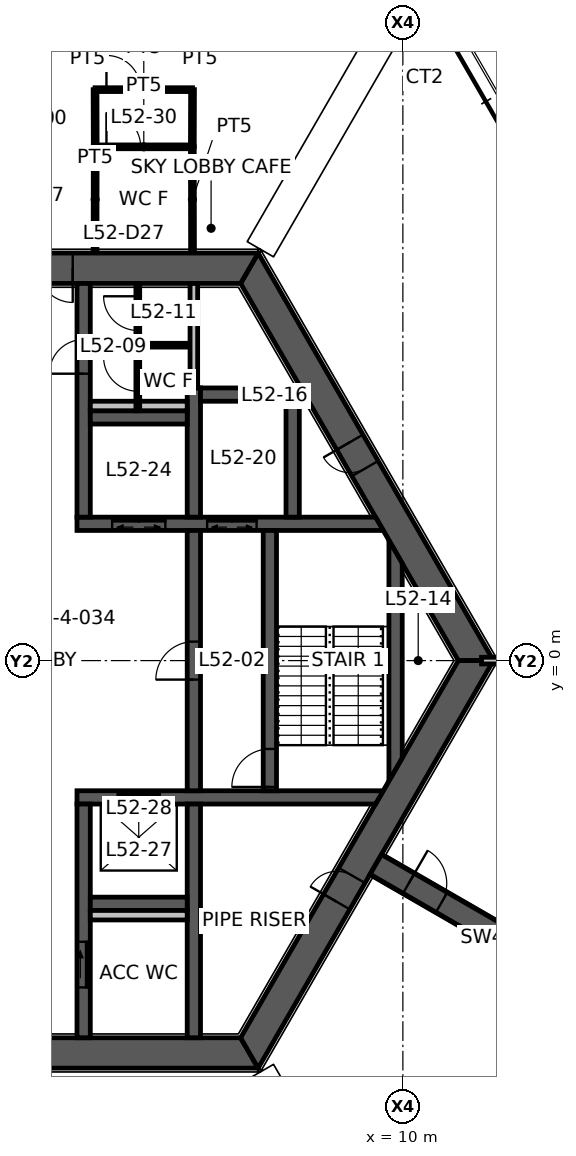
"""IFC4 building model, lengths in metres.
Left out: names, types, materials, properties, quantities, classifications, styles, units other than length and angle.
Written with IfcOpenShell. Run it as: python <this file> out.ifc"""

import sys

from ifc_helpers import new_model, si_unit, direction, frame, frame_2d, origin, place, context, subcontext, project, spatial, polyline, rectangle, outline, extrude, element, fill, save


model = new_model("IFC4")
c1 = context("Model", 3, precision=1e-05, world=origin(), true_north=direction((0.0, 1.0)))
c2 = subcontext(c1, "Body", "Model", "MODEL_VIEW")
j1 = project(units=[si_unit("LENGTHUNIT", "METRE"), si_unit("PLANEANGLEUNIT", "RADIAN")], contexts=[c1])
p1 = place(None, origin())
s1 = spatial("IfcSite", under=j1, at=p1, CompositionType="ELEMENT")
p2 = place(p1, origin())
s2 = spatial("IfcBuilding", under=s1, at=p2, CompositionType="ELEMENT")
p3 = place(p2, frame((0.0, 0.0, 208.3)))
s3 = spatial("IfcBuildingStorey", under=s2, at=p3, CompositionType="ELEMENT", Elevation=208.3)
p4 = place(p3, frame((11.922, 0.0, 0.0), z_axis=(0.0, 0.0, 1.0), x_axis=(-0.500004296715, 0.866022923061, 0.0)))
e1 = element("IfcWall", 1, at=p4, inside=s3, PredefinedType="SHEAR", context=c2, shape_type="SweptSolid", body=[
    extrude(outline(polyline([(-0.231, -0.4), (5.835, -0.4), (6.635, -0.4), (12.153, -0.4), (11.691, 0.4), (6.635, 0.4), (5.835, 0.4), (0.231, 0.4), (-0.231, -0.4)])), origin(), (0.0, 0.0, 1.0), 4.5),
])
p5 = place(p4, frame((5.835, 0.0, 0.0)))
e2 = element("IfcOpeningElement", 2, at=p5, cuts=e1, PredefinedType="OPENING", context=c2, shape_type="SweptSolid", body=[
    extrude(rectangle(XDim=0.8, YDim=2.1, at=frame_2d((0.4, 1.05))), frame((0.0, 0.41, 0.0), z_axis=(0.0, -1.0, 0.0), x_axis=(1.0, 0.0, 0.0)), (0.0, 0.0, 1.0), 0.82),
])
p6 = place(p3, frame((5.961, 10.325, 0.0), z_axis=(0.0, 0.0, 1.0), x_axis=(-1.0, 0.0, 0.0)))
e3 = element("IfcWall", 3, at=p6, inside=s3, PredefinedType="SHEAR", context=c2, shape_type="SweptSolid", body=[
    extrude(outline(polyline([(-0.231, -0.4), (4.649, -0.4), (5.549, -0.4), (6.374, -0.4), (7.273, -0.4), (12.153, -0.4), (11.691, 0.4), (7.273, 0.4), (6.374, 0.4), (5.549, 0.4), (4.649, 0.4), (0.231, 0.4), (-0.231, -0.4)])), origin(), (0.0, 0.0, 1.0), 4.5),
])
p7 = place(p6, frame((6.374, 0.0, 0.0)))
e4 = element("IfcOpeningElement", 4, at=p7, cuts=e3, PredefinedType="OPENING", context=c2, shape_type="SweptSolid", body=[
    extrude(rectangle(XDim=0.9, YDim=2.1, at=frame_2d((0.45, 1.05))), frame((0.0, 0.41, 0.0), z_axis=(0.0, -1.0, 0.0), x_axis=(1.0, 0.0, 0.0)), (0.0, 0.0, 1.0), 0.82),
])
p8 = place(p6, frame((4.649, 0.0, 0.0)))
e5 = element("IfcOpeningElement", 5, at=p8, cuts=e3, PredefinedType="OPENING", context=c2, shape_type="SweptSolid", body=[
    extrude(rectangle(XDim=0.9, YDim=2.1, at=frame_2d((0.45, 1.05))), frame((0.0, 0.41, 0.0), z_axis=(0.0, -1.0, 0.0), x_axis=(1.0, 0.0, 0.0)), (0.0, 0.0, 1.0), 0.82),
])
p9 = place(p3, frame((-5.961, -10.325, 0.0), z_axis=(0.0, 0.0, 1.0), x_axis=(1.0, 0.0, 0.0)))
e6 = element("IfcWall", 6, at=p9, inside=s3, PredefinedType="SHEAR", context=c2, shape_type="SweptSolid", body=[
    extrude(outline(polyline([(-0.231, -0.4), (5.461, -0.4), (6.461, -0.4), (12.153, -0.4), (11.691, 0.4), (6.461, 0.4), (5.461, 0.4), (0.231, 0.4), (-0.231, -0.4)])), origin(), (0.0, 0.0, 1.0), 4.5),
])
p10 = place(p9, frame((5.461, 0.0, 0.0)))
e7 = element("IfcOpeningElement", 7, at=p10, cuts=e6, PredefinedType="OPENING", context=c2, shape_type="SweptSolid", body=[
    extrude(rectangle(XDim=1.0, YDim=2.1, at=frame_2d((0.5, 1.05))), frame((0.0, 0.41, 0.0), z_axis=(0.0, -1.0, 0.0), x_axis=(1.0, 0.0, 0.0)), (0.0, 0.0, 1.0), 0.82),
])
p11 = place(p3, frame((5.961, -10.325, 0.0), z_axis=(0.0, 0.0, 1.0), x_axis=(0.500004296715, 0.866022923061, 0.0)))
e8 = element("IfcWall", 8, at=p11, inside=s3, PredefinedType="SHEAR", context=c2, shape_type="SweptSolid", body=[
    extrude(outline(polyline([(-0.231, -0.4), (4.594, -0.4), (5.394, -0.4), (12.153, -0.4), (11.691, 0.4), (5.394, 0.4), (4.594, 0.4), (0.231, 0.4), (-0.231, -0.4)])), origin(), (0.0, 0.0, 1.0), 4.5),
])
p12 = place(p11, frame((4.594, 0.0, 0.0)))
e9 = element("IfcOpeningElement", 9, at=p12, cuts=e8, PredefinedType="OPENING", context=c2, shape_type="SweptSolid", body=[
    extrude(rectangle(XDim=0.8, YDim=2.1, at=frame_2d((0.4, 1.05))), frame((0.0, 0.41, 0.0), z_axis=(0.0, -1.0, 0.0), x_axis=(1.0, 0.0, 0.0)), (0.0, 0.0, 1.0), 0.82),
])
p13 = place(p3, frame((9.288, -5.363, 0.0), z_axis=(0.0, 0.0, 1.0), x_axis=(0.866031736626, -0.499989031036, 0.0)))
e10 = element("IfcWall", 10, at=p13, inside=s3, PredefinedType="SHEAR", context=c2, shape_type="SweptSolid", body=[
    extrude(rectangle(XDim=7.796, YDim=0.6, at=frame_2d((3.898, 0.0))), origin(), (0.0, 0.0, 1.0), 4.5),
])
p14 = place(p13, frame((1.0, 0.0, 0.0)))
e11 = element("IfcOpeningElement", 11, at=p14, cuts=e10, PredefinedType="OPENING", context=c2, shape_type="SweptSolid", body=[
    extrude(rectangle(XDim=1.0, YDim=2.1, at=frame_2d((0.5, 1.05))), frame((0.0, 0.31, 0.0), z_axis=(0.0, -1.0, 0.0), x_axis=(1.0, 0.0, 0.0)), (0.0, 0.0, 1.0), 0.62),
])
p15 = place(p3, frame((1.425, 3.6, 0.0), z_axis=(0.0, 0.0, 1.0), x_axis=(1.0, 0.0, 0.0)))
e12 = element("IfcWall", 12, at=p15, inside=s3, PredefinedType="SHEAR", context=c2, shape_type="SweptSolid", body=[
    extrude(outline(polyline([(0.0, -0.175), (0.925, -0.175), (2.325, -0.175), (3.425, -0.175), (4.725, -0.175), (8.058, -0.175), (7.856, 0.175), (4.725, 0.175), (3.425, 0.175), (2.325, 0.175), (0.925, 0.175), (0.0, 0.175), (0.0, -0.175)])), origin(), (0.0, 0.0, 1.0), 4.5),
])
p16 = place(p15, frame((0.925, 0.0, 0.0)))
e13 = element("IfcOpeningElement", 13, at=p16, cuts=e12, PredefinedType="OPENING", context=c2, shape_type="SweptSolid", body=[
    extrude(rectangle(XDim=1.4, YDim=2.1, at=frame_2d((0.7, 1.05))), frame((0.0, 0.185, 0.0), z_axis=(0.0, -1.0, 0.0), x_axis=(1.0, 0.0, 0.0)), (0.0, 0.0, 1.0), 0.37),
])
p17 = place(p15, frame((3.425, 0.0, 0.0)))
e14 = element("IfcOpeningElement", 14, at=p17, cuts=e12, PredefinedType="OPENING", context=c2, shape_type="SweptSolid", body=[
    extrude(rectangle(XDim=1.3, YDim=2.1, at=frame_2d((0.65, 1.05))), frame((0.0, 0.185, 0.0), z_axis=(0.0, -1.0, 0.0), x_axis=(1.0, 0.0, 0.0)), (0.0, 0.0, 1.0), 0.37),
])
p18 = place(p3, frame((1.425, -3.6, 0.0), z_axis=(0.0, 0.0, 1.0), x_axis=(1.0, 0.0, 0.0)))
e15 = element("IfcWall", 15, at=p18, inside=s3, PredefinedType="SHEAR", context=c2, shape_type="SweptSolid", body=[
    extrude(outline(polyline([(0.0, -0.175), (1.075, -0.175), (2.175, -0.175), (7.856, -0.175), (8.058, 0.175), (2.175, 0.175), (1.075, 0.175), (0.0, 0.175), (0.0, -0.175)])), origin(), (0.0, 0.0, 1.0), 4.5),
])
p19 = place(p18, frame((1.075, 0.0, 0.0)))
e16 = element("IfcOpeningElement", 16, at=p19, cuts=e15, PredefinedType="OPENING", context=c2, shape_type="SweptSolid", body=[
    extrude(rectangle(XDim=1.1, YDim=2.1, at=frame_2d((0.55, 1.05))), frame((0.0, 0.185, 0.0), z_axis=(0.0, -1.0, 0.0), x_axis=(1.0, 0.0, 0.0)), (0.0, 0.0, 1.0), 0.37),
])
p20 = place(p3, frame((1.6, 3.775, 0.0), z_axis=(0.0, 0.0, 1.0), x_axis=(0.0, 1.0, 0.0)))
e17 = element("IfcWall", 17, at=p20, inside=s3, PredefinedType="SHEAR", context=c2, shape_type="SweptSolid", body=[
    extrude(rectangle(XDim=6.15, YDim=0.35, at=frame_2d((3.075, 0.0))), origin(), (0.0, 0.0, 1.0), 4.5),
])
p21 = place(p20, frame((3.775, 0.0, 0.0)))
e18 = element("IfcOpeningElement", 18, at=p21, cuts=e17, PredefinedType="OPENING", context=c2, shape_type="SweptSolid", body=[
    extrude(rectangle(XDim=0.9, YDim=2.1, at=frame_2d((0.45, 1.05))), frame((0.0, 0.185, 0.0), z_axis=(0.0, -1.0, 0.0), x_axis=(1.0, 0.0, 0.0)), (0.0, 0.0, 1.0), 0.37),
])
p22 = place(p3, frame((1.6, -3.775, 0.0), z_axis=(0.0, 0.0, 1.0), x_axis=(0.0, -1.0, 0.0)))
e19 = element("IfcWall", 19, at=p22, inside=s3, PredefinedType="SHEAR", context=c2, shape_type="SweptSolid", body=[
    extrude(rectangle(XDim=6.15, YDim=0.35, at=frame_2d((3.075, 0.0))), origin(), (0.0, 0.0, 1.0), 4.5),
])
p23 = place(p22, frame((3.625, 0.0, 0.0)))
e20 = element("IfcOpeningElement", 20, at=p23, cuts=e19, PredefinedType="OPENING", context=c2, shape_type="SweptSolid", body=[
    extrude(rectangle(XDim=1.2, YDim=2.1, at=frame_2d((0.6, 1.05))), frame((0.0, 0.185, 0.0), z_axis=(0.0, -1.0, 0.0), x_axis=(1.0, 0.0, 0.0)), (0.0, 0.0, 1.0), 0.37),
])
p24 = place(p3, frame((4.5, -3.425, 0.0), z_axis=(0.0, 0.0, 1.0), x_axis=(0.0, 1.0, 0.0)))
e21 = element("IfcWall", 21, at=p24, inside=s3, PredefinedType="SHEAR", context=c2, shape_type="SweptSolid", body=[
    extrude(rectangle(XDim=6.85, YDim=0.35, at=frame_2d((3.425, 0.0))), origin(), (0.0, 0.0, 1.0), 4.5),
])
p25 = place(p24, frame((2.925, 0.0, 0.0)))
e22 = element("IfcOpeningElement", 22, at=p25, cuts=e21, PredefinedType="OPENING", context=c2, shape_type="SweptSolid", body=[
    extrude(rectangle(XDim=1.0, YDim=2.1, at=frame_2d((0.5, 1.05))), frame((0.0, 0.185, 0.0), z_axis=(0.0, -1.0, 0.0), x_axis=(1.0, 0.0, 0.0)), (0.0, 0.0, 1.0), 0.37),
])
p26 = place(p3, frame((6.5, -3.425, 0.0), z_axis=(0.0, 0.0, 1.0), x_axis=(0.0, 1.0, 0.0)))
e23 = element("IfcWall", 23, at=p26, inside=s3, PredefinedType="SHEAR", context=c2, shape_type="SweptSolid", body=[
    extrude(rectangle(XDim=6.85, YDim=0.35, at=frame_2d((3.425, 0.0))), origin(), (0.0, 0.0, 1.0), 4.5),
])
p27 = place(p26, frame((0.1, 0.0, 0.0)))
e24 = element("IfcOpeningElement", 24, at=p27, cuts=e23, PredefinedType="OPENING", context=c2, shape_type="SweptSolid", body=[
    extrude(rectangle(XDim=1.0, YDim=2.1, at=frame_2d((0.5, 1.05))), frame((0.0, 0.185, 0.0), z_axis=(0.0, -1.0, 0.0), x_axis=(1.0, 0.0, 0.0)), (0.0, 0.0, 1.0), 0.37),
])
p28 = place(p3, frame((4.5, 3.775, 0.0), z_axis=(0.0, 0.0, 1.0), x_axis=(0.0, 1.0, 0.0)))
e25 = element("IfcWall", 25, at=p28, inside=s3, PredefinedType="SHEAR", context=c2, shape_type="SweptSolid", body=[
    extrude(rectangle(XDim=3.4, YDim=0.35, at=frame_2d((1.7, 0.0))), origin(), (0.0, 0.0, 1.0), 4.5),
])
p29 = place(p3, frame((4.5, -3.775, 0.0), z_axis=(0.0, 0.0, 1.0), x_axis=(0.0, -1.0, 0.0)))
e26 = element("IfcWall", 26, at=p29, inside=s3, PredefinedType="SHEAR", context=c2, shape_type="SweptSolid", body=[
    extrude(rectangle(XDim=6.15, YDim=0.35, at=frame_2d((3.075, 0.0))), origin(), (0.0, 0.0, 1.0), 4.5),
])
for number, where, z_axis, x_axis in (
    (27, (1.775, 6.4, 0.0), (0.0, 0.0, 1.0), (1.0, 0.0, 0.0)),
    (28, (1.775, -6.4, 0.0), (0.0, 0.0, 1.0), (1.0, 0.0, 0.0)),
):
    element("IfcWall", number, at=place(p3, frame(where, z_axis=z_axis, x_axis=x_axis)), inside=s3, PredefinedType="SHEAR", context=c2, shape_type="SweptSolid", body=[
        extrude(rectangle(XDim=2.55, YDim=0.35, at=frame_2d((1.275, 0.0))), origin(), (0.0, 0.0, 1.0), 4.5),
    ])
p30 = place(p3, frame((4.675, 7.0, 0.0), z_axis=(0.0, 0.0, 1.0), x_axis=(1.0, 0.0, 0.0)))
e29 = element("IfcWall", 29, at=p30, inside=s3, PredefinedType="SHEAR", context=c2, shape_type="SweptSolid", body=[
    extrude(rectangle(XDim=2.6, YDim=0.35, at=frame_2d((1.3, 0.0))), origin(), (0.0, 0.0, 1.0), 4.5),
])
p31 = place(p3, frame((7.1, 3.775, 0.0), z_axis=(0.0, 0.0, 1.0), x_axis=(0.0, 1.0, 0.0)))
e30 = element("IfcWall", 30, at=p31, inside=s3, PredefinedType="SHEAR", context=c2, shape_type="SweptSolid", body=[
    extrude(rectangle(XDim=3.05, YDim=0.35, at=frame_2d((1.525, 0.0))), origin(), (0.0, 0.0, 1.0), 4.5),
])
p32 = place(p3, frame((9.808, -2.862, 0.0), z_axis=(0.0, 0.0, 1.0), x_axis=(0.0, 1.0, 0.0)))
e31 = element("IfcWall", 31, at=p32, inside=s3, PredefinedType="SHEAR", context=c2, shape_type="SweptSolid", body=[
    extrude(outline(polyline([(0.303, -0.175), (5.421, -0.175), (6.028, 0.175), (-0.303, 0.175), (0.303, -0.175)])), origin(), (0.0, 0.0, 1.0), 4.5),
])
p33 = place(p3, frame((4.5, 7.175, 0.0), z_axis=(0.0, 0.0, 1.0), x_axis=(0.0, 1.0, 0.0)))
e32 = element("IfcWall", 32, at=p33, inside=s3, PredefinedType="STANDARD", context=c2, shape_type="SweptSolid", body=[
    extrude(rectangle(XDim=2.75, YDim=0.2, at=frame_2d((1.375, 0.0))), origin(), (0.0, 0.0, 1.0), 4.5),
])
for number, where, z_axis, x_axis in (
    (33, (1.775, 6.7, 0.0), (0.0, 0.0, 1.0), (1.0, 0.0, 0.0)),
    (34, (1.775, -6.7, 0.0), (0.0, 0.0, 1.0), (1.0, 0.0, 0.0)),
):
    element("IfcWall", number, at=place(p3, frame(where, z_axis=z_axis, x_axis=x_axis)), inside=s3, PredefinedType="PLUMBINGWALL", context=c2, shape_type="SweptSolid", body=[
        extrude(rectangle(XDim=2.55, YDim=0.25, at=frame_2d((1.275, 0.0))), origin(), (0.0, 0.0, 1.0), 4.5),
    ])
p34 = place(p3, frame((3.025, 6.575, 0.0), z_axis=(0.0, 0.0, 1.0), x_axis=(0.0, 1.0, 0.0)))
e35 = element("IfcWall", 35, at=p34, inside=s3, PredefinedType="PARTITIONING", context=c2, shape_type="SweptSolid", body=[
    extrude(rectangle(XDim=3.35, YDim=0.1, at=frame_2d((1.675, 0.0))), origin(), (0.0, 0.0, 1.0), 3.55),
])
p35 = place(p34, frame((0.512, 0.0, 0.0)))
e36 = element("IfcOpeningElement", 36, at=p35, cuts=e35, PredefinedType="OPENING", context=c2, shape_type="SweptSolid", body=[
    extrude(rectangle(XDim=0.9, YDim=2.1, at=frame_2d((0.45, 1.05))), frame((0.0, 0.06, 0.0), z_axis=(0.0, -1.0, 0.0), x_axis=(1.0, 0.0, 0.0)), (0.0, 0.0, 1.0), 0.12),
])
p36 = place(p34, frame((2.113, 0.0, 0.0)))
e37 = element("IfcOpeningElement", 37, at=p36, cuts=e35, PredefinedType="OPENING", context=c2, shape_type="SweptSolid", body=[
    extrude(rectangle(XDim=0.9, YDim=2.1, at=frame_2d((0.45, 1.05))), frame((0.0, 0.06, 0.0), z_axis=(0.0, -1.0, 0.0), x_axis=(1.0, 0.0, 0.0)), (0.0, 0.0, 1.0), 0.12),
])
p37 = place(p3, frame((3.075, 8.3, 0.0), z_axis=(0.0, 0.0, 1.0), x_axis=(1.0, 0.0, 0.0)))
e38 = element("IfcWall", 38, at=p37, inside=s3, PredefinedType="PARTITIONING", context=c2, shape_type="SweptSolid", body=[
    extrude(rectangle(XDim=1.25, YDim=0.1, at=frame_2d((0.625, 0.0))), origin(), (0.0, 0.0, 1.0), 3.55),
])
p38 = place(p3, frame((12.07, 0.0, 0.0), z_axis=(0.0, 0.0, 1.0), x_axis=(1.0, 0.0, 0.0)))
e39 = element("IfcWall", 39, at=p38, inside=s3, PredefinedType="PARTITIONING", context=c2, shape_type="SweptSolid", body=[
    extrude(rectangle(XDim=7.93, YDim=0.175, at=frame_2d((3.965, 0.0))), origin(), (0.0, 0.0, 1.0), 3.65),
])
p39 = place(p38, frame((1.13, 0.0, 0.0)))
e40 = element("IfcOpeningElement", 40, at=p39, cuts=e39, PredefinedType="OPENING", context=c2, shape_type="SweptSolid", body=[
    extrude(rectangle(XDim=1.0, YDim=2.1, at=frame_2d((0.5, 1.05))), frame((0.0, 0.098, 0.0), z_axis=(0.0, -1.0, 0.0), x_axis=(1.0, 0.0, 0.0)), (0.0, 0.0, 1.0), 0.195),
])
p40 = place(p3, frame((1.9, 13.52, 0.0), z_axis=(0.0, 0.0, 1.0), x_axis=(1.0, 0.0, 0.0)))
e41 = element("IfcWall", 41, at=p40, inside=s3, PredefinedType="PARTITIONING", context=c2, shape_type="SweptSolid", body=[
    extrude(rectangle(XDim=2.565, YDim=0.1, at=frame_2d((1.283, 0.0))), origin(), (0.0, 0.0, 1.0), 3.55),
])
p41 = place(p40, frame((0.3, 0.0, 0.0)))
e42 = element("IfcOpeningElement", 42, at=p41, cuts=e41, PredefinedType="OPENING", context=c2, shape_type="SweptSolid", body=[
    extrude(rectangle(XDim=0.9, YDim=2.1, at=frame_2d((0.45, 1.05))), frame((0.0, 0.06, 0.0), z_axis=(0.0, -1.0, 0.0), x_axis=(1.0, 0.0, 0.0)), (0.0, 0.0, 1.0), 0.12),
])
for number, where, z_axis, x_axis in (
    (43, (1.9, 10.745, 0.0), (0.0, 0.0, 1.0), (0.002, 1.0, 0.0)),
    (44, (4.46, 13.525, 0.0), (0.0, 0.0, 1.0), (0.002, -1.0, 0.0)),
):
    element("IfcWall", number, at=place(p3, frame(where, z_axis=z_axis, x_axis=x_axis)), inside=s3, PredefinedType="PARTITIONING", context=c2, shape_type="SweptSolid", body=[
        extrude(rectangle(XDim=2.78, YDim=0.1, at=frame_2d((1.39, 0.0))), origin(), (0.0, 0.0, 1.0), 3.55),
    ])
p42 = place(p3, frame((1.9, 15.025, 0.0), z_axis=(0.0, 0.0, 1.0), x_axis=(1.0, 0.0, 0.0)))
e45 = element("IfcWall", 45, at=p42, inside=s3, PredefinedType="PARTITIONING", context=c2, shape_type="SweptSolid", body=[
    extrude(rectangle(XDim=2.565, YDim=0.1, at=frame_2d((1.283, 0.0))), origin(), (0.0, 0.0, 1.0), 3.55),
])
p43 = place(p42, frame((0.3, 0.0, 0.0)))
e46 = element("IfcOpeningElement", 46, at=p43, cuts=e45, PredefinedType="OPENING", context=c2, shape_type="SweptSolid", body=[
    extrude(rectangle(XDim=0.9, YDim=2.1, at=frame_2d((0.45, 1.05))), frame((0.0, 0.06, 0.0), z_axis=(0.0, -1.0, 0.0), x_axis=(1.0, 0.0, 0.0)), (0.0, 0.0, 1.0), 0.12),
])
for number, where, z_axis, x_axis in (
    (47, (1.905, 13.525, 0.0), (0.0, 0.0, 1.0), (-0.003, 1.0, 0.0)),
    (48, (4.465, 15.025, 0.0), (0.0, 0.0, 1.0), (-0.003, -1.0, 0.0)),
):
    element("IfcWall", number, at=place(p3, frame(where, z_axis=z_axis, x_axis=x_axis)), inside=s3, PredefinedType="PARTITIONING", context=c2, shape_type="SweptSolid", body=[
        extrude(rectangle(XDim=1.5, YDim=0.1, at=frame_2d((0.75, 0.0))), origin(), (0.0, 0.0, 1.0), 3.55),
    ])
p44 = place(p8, origin())
e49 = element("IfcDoor", 49, at=p44, inside=s3, OperationType="SINGLE_SWING_LEFT", PredefinedType="DOOR", context=c2, shape_type="SweptSolid", body=[
    extrude(rectangle(XDim=0.9, YDim=2.1, at=frame_2d((0.45, 1.05))), frame((0.0, 0.025, 0.0), z_axis=(0.0, -1.0, 0.0), x_axis=(1.0, 0.0, 0.0)), (0.0, 0.0, 1.0), 0.05),
])
fill(e5, e49)
p45 = place(p5, origin())
e50 = element("IfcDoor", 50, at=p45, inside=s3, OperationType="SINGLE_SWING_RIGHT", PredefinedType="DOOR", context=c2, shape_type="SweptSolid", body=[
    extrude(rectangle(XDim=0.8, YDim=2.1, at=frame_2d((0.4, 1.05))), frame((0.0, 0.025, 0.0), z_axis=(0.0, -1.0, 0.0), x_axis=(1.0, 0.0, 0.0)), (0.0, 0.0, 1.0), 0.05),
])
fill(e2, e50)
p46 = place(p12, origin())
e51 = element("IfcDoor", 51, at=p46, inside=s3, OperationType="SINGLE_SWING_LEFT", PredefinedType="DOOR", context=c2, shape_type="SweptSolid", body=[
    extrude(rectangle(XDim=0.8, YDim=2.1, at=frame_2d((0.4, 1.05))), frame((0.0, 0.025, 0.0), z_axis=(0.0, -1.0, 0.0), x_axis=(1.0, 0.0, 0.0)), (0.0, 0.0, 1.0), 0.05),
])
fill(e9, e51)
p47 = place(p25, origin())
e52 = element("IfcDoor", 52, at=p47, inside=s3, OperationType="SINGLE_SWING_LEFT", PredefinedType="DOOR", context=c2, shape_type="SweptSolid", body=[
    extrude(rectangle(XDim=1.0, YDim=2.1, at=frame_2d((0.5, 1.05))), frame((0.0, 0.025, 0.0), z_axis=(0.0, -1.0, 0.0), x_axis=(1.0, 0.0, 0.0)), (0.0, 0.0, 1.0), 0.05),
])
fill(e22, e52)
p48 = place(p27, origin())
e53 = element("IfcDoor", 53, at=p48, inside=s3, OperationType="SINGLE_SWING_LEFT", PredefinedType="DOOR", context=c2, shape_type="SweptSolid", body=[
    extrude(rectangle(XDim=1.0, YDim=2.1, at=frame_2d((0.5, 1.05))), frame((0.0, 0.025, 0.0), z_axis=(0.0, -1.0, 0.0), x_axis=(1.0, 0.0, 0.0)), (0.0, 0.0, 1.0), 0.05),
])
fill(e24, e53)
p49 = place(p21, origin())
e54 = element("IfcDoor", 54, at=p49, inside=s3, OperationType="SINGLE_SWING_LEFT", PredefinedType="DOOR", context=c2, shape_type="SweptSolid", body=[
    extrude(rectangle(XDim=0.9, YDim=2.1, at=frame_2d((0.45, 1.05))), frame((0.0, 0.025, 0.0), z_axis=(0.0, -1.0, 0.0), x_axis=(1.0, 0.0, 0.0)), (0.0, 0.0, 1.0), 0.05),
])
fill(e18, e54)
p50 = place(p23, origin())
e55 = element("IfcDoor", 55, at=p50, inside=s3, OperationType="SLIDING_TO_LEFT", PredefinedType="DOOR", context=c2, shape_type="SweptSolid", body=[
    extrude(rectangle(XDim=1.2, YDim=2.1, at=frame_2d((0.6, 1.05))), frame((0.0, 0.025, 0.0), z_axis=(0.0, -1.0, 0.0), x_axis=(1.0, 0.0, 0.0)), (0.0, 0.0, 1.0), 0.05),
])
fill(e20, e55)
p51 = place(p14, origin())
e56 = element("IfcDoor", 56, at=p51, inside=s3, OperationType="SINGLE_SWING_LEFT", PredefinedType="DOOR", context=c2, shape_type="SweptSolid", body=[
    extrude(rectangle(XDim=1.0, YDim=2.1, at=frame_2d((0.5, 1.05))), frame((0.0, 0.025, 0.0), z_axis=(0.0, -1.0, 0.0), x_axis=(1.0, 0.0, 0.0)), (0.0, 0.0, 1.0), 0.05),
])
fill(e11, e56)
p52 = place(p35, origin())
e57 = element("IfcDoor", 57, at=p52, inside=s3, OperationType="SINGLE_SWING_RIGHT", PredefinedType="DOOR", context=c2, shape_type="SweptSolid", body=[
    extrude(rectangle(XDim=0.9, YDim=2.1, at=frame_2d((0.45, 1.05))), frame((0.0, 0.025, 0.0), z_axis=(0.0, -1.0, 0.0), x_axis=(1.0, 0.0, 0.0)), (0.0, 0.0, 1.0), 0.05),
])
fill(e36, e57)
p53 = place(p36, origin())
e58 = element("IfcDoor", 58, at=p53, inside=s3, OperationType="SINGLE_SWING_RIGHT", PredefinedType="DOOR", context=c2, shape_type="SweptSolid", body=[
    extrude(rectangle(XDim=0.9, YDim=2.1, at=frame_2d((0.45, 1.05))), frame((0.0, 0.025, 0.0), z_axis=(0.0, -1.0, 0.0), x_axis=(1.0, 0.0, 0.0)), (0.0, 0.0, 1.0), 0.05),
])
fill(e37, e58)
p54 = place(p41, origin())
e59 = element("IfcDoor", 59, at=p54, inside=s3, OperationType="SINGLE_SWING_LEFT", PredefinedType="DOOR", context=c2, shape_type="SweptSolid", body=[
    extrude(rectangle(XDim=0.9, YDim=2.1, at=frame_2d((0.45, 1.05))), frame((0.0, 0.025, 0.0), z_axis=(0.0, -1.0, 0.0), x_axis=(1.0, 0.0, 0.0)), (0.0, 0.0, 1.0), 0.05),
])
fill(e42, e59)
p55 = place(p43, origin())
e60 = element("IfcDoor", 60, at=p55, inside=s3, OperationType="SINGLE_SWING_LEFT", PredefinedType="DOOR", context=c2, shape_type="SweptSolid", body=[
    extrude(rectangle(XDim=0.9, YDim=2.1, at=frame_2d((0.45, 1.05))), frame((0.0, 0.025, 0.0), z_axis=(0.0, -1.0, 0.0), x_axis=(1.0, 0.0, 0.0)), (0.0, 0.0, 1.0), 0.05),
])
fill(e46, e60)
p56 = place(p19, origin())
e61 = element("IfcDoor", 61, at=p56, inside=s3, OperationType="DOUBLE_DOOR_SLIDING", PredefinedType="DOOR", context=c2, shape_type="SweptSolid", body=[
    extrude(rectangle(XDim=1.1, YDim=2.1, at=frame_2d((0.55, 1.05))), frame((0.0, 0.025, 0.0), z_axis=(0.0, -1.0, 0.0), x_axis=(1.0, 0.0, 0.0)), (0.0, 0.0, 1.0), 0.05),
])
fill(e16, e61)
p57 = place(p16, origin())
e62 = element("IfcDoor", 62, at=p57, inside=s3, OperationType="DOUBLE_DOOR_SLIDING", PredefinedType="DOOR", context=c2, shape_type="SweptSolid", body=[
    extrude(rectangle(XDim=1.4, YDim=2.1, at=frame_2d((0.7, 1.05))), frame((0.0, 0.025, 0.0), z_axis=(0.0, -1.0, 0.0), x_axis=(1.0, 0.0, 0.0)), (0.0, 0.0, 1.0), 0.05),
])
fill(e13, e62)
p58 = place(p17, origin())
e63 = element("IfcDoor", 63, at=p58, inside=s3, OperationType="DOUBLE_DOOR_SLIDING", PredefinedType="DOOR", context=c2, shape_type="SweptSolid", body=[
    extrude(rectangle(XDim=1.3, YDim=2.1, at=frame_2d((0.65, 1.05))), frame((0.0, 0.025, 0.0), z_axis=(0.0, -1.0, 0.0), x_axis=(1.0, 0.0, 0.0)), (0.0, 0.0, 1.0), 0.05),
])
fill(e14, e63)
save(model, sys.argv[1])
